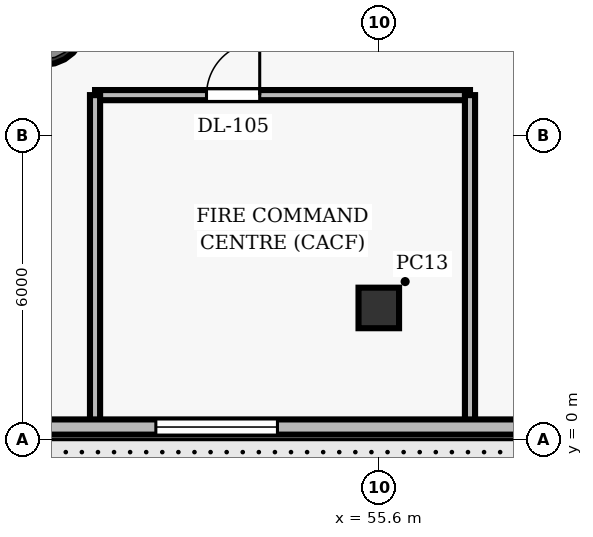
"""IFC4 building model, lengths in metres.
Left out: names, types, materials, properties, quantities, classifications, styles, units other than length and angle.
Written with IfcOpenShell. Run it as: python <this file> out.ifc"""

import sys

from ifc_helpers import new_model, si_unit, direction, frame, frame_2d, origin, origin_2d, place, context, subcontext, project, spatial, rectangle, hollow_circle, extrude, element, fill, save


model = new_model("IFC4")
c1 = context("Model", 3, precision=1e-05, world=origin(), true_north=direction((0.0, 1.0)))
c2 = subcontext(c1, "Body", "Model", "MODEL_VIEW")
j1 = project(units=[si_unit("LENGTHUNIT", "METRE"), si_unit("PLANEANGLEUNIT", "RADIAN")], contexts=[c1])
p1 = place(None, origin())
s1 = spatial("IfcSite", under=j1, at=p1, CompositionType="ELEMENT")
p2 = place(p1, origin())
s2 = spatial("IfcBuilding", under=s1, at=p2, CompositionType="ELEMENT")
p3 = place(p2, origin())
s3 = spatial("IfcBuildingStorey", under=s2, at=p3, CompositionType="ELEMENT", Elevation=0.0)
p4 = place(p3, frame((55.6, 2.6, 0.0), z_axis=(0.0, 0.0, 1.0), x_axis=(1.0, 0.0, 0.0)))
e1 = element("IfcColumn", 1, at=p4, inside=s3, PredefinedType="COLUMN", context=c2, shape_type="SweptSolid", body=[
    extrude(rectangle(XDim=0.8, YDim=0.8, at=origin_2d()), origin(), (0.0, 0.0, 1.0), 6.6),
])
p5 = place(p3, frame((49.0, 8.2, 0.0), z_axis=(0.0, 0.0, 1.0), x_axis=(1.0, 0.0, 0.0)))
e2 = element("IfcColumn", 2, at=p5, inside=s3, PredefinedType="COLUMN", context=c2, shape_type="SweptSolid", body=[
    extrude(hollow_circle(Radius=0.8, WallThickness=0.06, at=origin_2d()), origin(), (0.0, 0.0, 1.0), 6.6),
])
p6 = place(p3, frame((50.0, 6.8, 0.0), z_axis=(0.0, 0.0, 1.0), x_axis=(1.0, 0.0, 0.0)))
e3 = element("IfcWall", 3, at=p6, inside=s3, PredefinedType="PARTITIONING", context=c2, shape_type="SweptSolid", body=[
    extrude(rectangle(XDim=7.4, YDim=0.2, at=frame_2d((3.7, 0.0))), origin(), (0.0, 0.0, 1.0), 5.31),
])
p7 = place(p6, frame((2.2, 0.0, 0.0)))
e4 = element("IfcOpeningElement", 4, at=p7, cuts=e3, PredefinedType="OPENING", context=c2, shape_type="SweptSolid", body=[
    extrude(rectangle(XDim=1.05, YDim=2.15, at=frame_2d((0.525, 1.075))), frame((0.0, 0.11, 0.0), z_axis=(0.0, -1.0, 0.0), x_axis=(1.0, 0.0, 0.0)), (0.0, 0.0, 1.0), 0.22),
])
for number, where, z_axis, x_axis in (
    (5, (50.0, 0.14, 0.0), (0.0, 0.0, 1.0), (0.0, 1.0, 0.0)),
    (6, (57.4, 0.14, 0.0), (0.0, 0.0, 1.0), (0.0, 1.0, 0.0)),
):
    element("IfcWall", number, at=place(p3, frame(where, z_axis=z_axis, x_axis=x_axis)), inside=s3, PredefinedType="PARTITIONING", context=c2, shape_type="SweptSolid", body=[
        extrude(rectangle(XDim=6.66, YDim=0.2, at=frame_2d((3.33, 0.0))), origin(), (0.0, 0.0, 1.0), 5.31),
    ])
p8 = place(p3, frame((75.6, 0.25, 0.0), z_axis=(0.0, 0.0, 1.0), x_axis=(-1.0, 0.0, 0.0)))
e7 = element("IfcWall", 7, at=p8, inside=s3, PredefinedType="SOLIDWALL", context=c2, shape_type="SweptSolid", body=[
    extrude(rectangle(XDim=75.2, YDim=0.3, at=frame_2d((37.6, 0.0))), origin(), (0.0, 0.0, 1.0), 5.76),
])
p9 = place(p8, frame((8.0, 0.0, 1.0)))
e8 = element("IfcOpeningElement", 8, at=p9, cuts=e7, PredefinedType="OPENING", context=c2, shape_type="SweptSolid", body=[
    extrude(rectangle(XDim=2.4, YDim=2.0, at=frame_2d((1.2, 1.0))), frame((0.0, 0.16, 0.0), z_axis=(0.0, -1.0, 0.0), x_axis=(1.0, 0.0, 0.0)), (0.0, 0.0, 1.0), 0.32),
])
p10 = place(p8, frame((22.0, 0.0, 1.0)))
e9 = element("IfcOpeningElement", 9, at=p10, cuts=e7, PredefinedType="OPENING", context=c2, shape_type="SweptSolid", body=[
    extrude(rectangle(XDim=2.4, YDim=2.0, at=frame_2d((1.2, 1.0))), frame((0.0, 0.16, 0.0), z_axis=(0.0, -1.0, 0.0), x_axis=(1.0, 0.0, 0.0)), (0.0, 0.0, 1.0), 0.32),
])
p11 = place(p8, frame((44.0, 0.0, 1.0)))
e10 = element("IfcOpeningElement", 10, at=p11, cuts=e7, PredefinedType="OPENING", context=c2, shape_type="SweptSolid", body=[
    extrude(rectangle(XDim=2.4, YDim=2.0, at=frame_2d((1.2, 1.0))), frame((0.0, 0.16, 0.0), z_axis=(0.0, -1.0, 0.0), x_axis=(1.0, 0.0, 0.0)), (0.0, 0.0, 1.0), 0.32),
])
p12 = place(p8, frame((56.0, 0.0, 1.0)))
e11 = element("IfcOpeningElement", 11, at=p12, cuts=e7, PredefinedType="OPENING", context=c2, shape_type="SweptSolid", body=[
    extrude(rectangle(XDim=2.4, YDim=2.0, at=frame_2d((1.2, 1.0))), frame((0.0, 0.16, 0.0), z_axis=(0.0, -1.0, 0.0), x_axis=(1.0, 0.0, 0.0)), (0.0, 0.0, 1.0), 0.32),
])
p13 = place(p8, frame((4.6, 0.0, 0.0)))
e12 = element("IfcOpeningElement", 12, at=p13, cuts=e7, PredefinedType="OPENING", context=c2, shape_type="SweptSolid", body=[
    extrude(rectangle(XDim=1.8, YDim=2.3, at=frame_2d((0.9, 1.15))), frame((0.0, 0.16, 0.0), z_axis=(0.0, -1.0, 0.0), x_axis=(1.0, 0.0, 0.0)), (0.0, 0.0, 1.0), 0.32),
])
p14 = place(p8, frame((12.2, 0.0, 0.0)))
e13 = element("IfcOpeningElement", 13, at=p14, cuts=e7, PredefinedType="OPENING", context=c2, shape_type="SweptSolid", body=[
    extrude(rectangle(XDim=1.8, YDim=2.3, at=frame_2d((0.9, 1.15))), frame((0.0, 0.16, 0.0), z_axis=(0.0, -1.0, 0.0), x_axis=(1.0, 0.0, 0.0)), (0.0, 0.0, 1.0), 0.32),
])
p15 = place(p8, frame((27.6, 0.0, 0.0)))
e14 = element("IfcOpeningElement", 14, at=p15, cuts=e7, PredefinedType="OPENING", context=c2, shape_type="SweptSolid", body=[
    extrude(rectangle(XDim=1.8, YDim=2.3, at=frame_2d((0.9, 1.15))), frame((0.0, 0.16, 0.0), z_axis=(0.0, -1.0, 0.0), x_axis=(1.0, 0.0, 0.0)), (0.0, 0.0, 1.0), 0.32),
])
p16 = place(p8, frame((31.4, 0.0, 0.0)))
e15 = element("IfcOpeningElement", 15, at=p16, cuts=e7, PredefinedType="OPENING", context=c2, shape_type="SweptSolid", body=[
    extrude(rectangle(XDim=1.8, YDim=2.3, at=frame_2d((0.9, 1.15))), frame((0.0, 0.16, 0.0), z_axis=(0.0, -1.0, 0.0), x_axis=(1.0, 0.0, 0.0)), (0.0, 0.0, 1.0), 0.32),
])
p17 = place(p8, frame((35.2, 0.0, 0.0)))
e16 = element("IfcOpeningElement", 16, at=p17, cuts=e7, PredefinedType="OPENING", context=c2, shape_type="SweptSolid", body=[
    extrude(rectangle(XDim=1.8, YDim=2.3, at=frame_2d((0.9, 1.15))), frame((0.0, 0.16, 0.0), z_axis=(0.0, -1.0, 0.0), x_axis=(1.0, 0.0, 0.0)), (0.0, 0.0, 1.0), 0.32),
])
p18 = place(p8, frame((38.8, 0.0, 0.0)))
e17 = element("IfcOpeningElement", 17, at=p18, cuts=e7, PredefinedType="OPENING", context=c2, shape_type="SweptSolid", body=[
    extrude(rectangle(XDim=1.8, YDim=2.3, at=frame_2d((0.9, 1.15))), frame((0.0, 0.16, 0.0), z_axis=(0.0, -1.0, 0.0), x_axis=(1.0, 0.0, 0.0)), (0.0, 0.0, 1.0), 0.32),
])
p19 = place(p8, frame((48.2, 0.0, 0.0)))
e18 = element("IfcOpeningElement", 18, at=p19, cuts=e7, PredefinedType="OPENING", context=c2, shape_type="SweptSolid", body=[
    extrude(rectangle(XDim=1.8, YDim=2.3, at=frame_2d((0.9, 1.15))), frame((0.0, 0.16, 0.0), z_axis=(0.0, -1.0, 0.0), x_axis=(1.0, 0.0, 0.0)), (0.0, 0.0, 1.0), 0.32),
])
p20 = place(p8, frame((61.2, 0.0, 0.0)))
e19 = element("IfcOpeningElement", 19, at=p20, cuts=e7, PredefinedType="OPENING", context=c2, shape_type="SweptSolid", body=[
    extrude(rectangle(XDim=1.8, YDim=2.3, at=frame_2d((0.9, 1.15))), frame((0.0, 0.16, 0.0), z_axis=(0.0, -1.0, 0.0), x_axis=(1.0, 0.0, 0.0)), (0.0, 0.0, 1.0), 0.32),
])
p21 = place(p7, origin())
e20 = element("IfcDoor", 20, at=p21, inside=s3, OperationType="SINGLE_SWING_RIGHT", PredefinedType="DOOR", context=c2, shape_type="SweptSolid", body=[
    extrude(rectangle(XDim=1.05, YDim=2.15, at=frame_2d((0.525, 1.075))), frame((0.0, 0.025, 0.0), z_axis=(0.0, -1.0, 0.0), x_axis=(1.0, 0.0, 0.0)), (0.0, 0.0, 1.0), 0.05),
])
fill(e4, e20)
p22 = place(p10, origin())
e21 = element("IfcWindow", 21, at=p22, inside=s3, PartitioningType="SINGLE_PANEL", PredefinedType="WINDOW", context=c2, shape_type="SweptSolid", body=[
    extrude(rectangle(XDim=2.4, YDim=2.0, at=frame_2d((1.2, 1.0))), frame((0.0, 0.03, 0.0), z_axis=(0.0, -1.0, 0.0), x_axis=(1.0, 0.0, 0.0)), (0.0, 0.0, 1.0), 0.06),
])
fill(e9, e21)
save(model, sys.argv[1])
